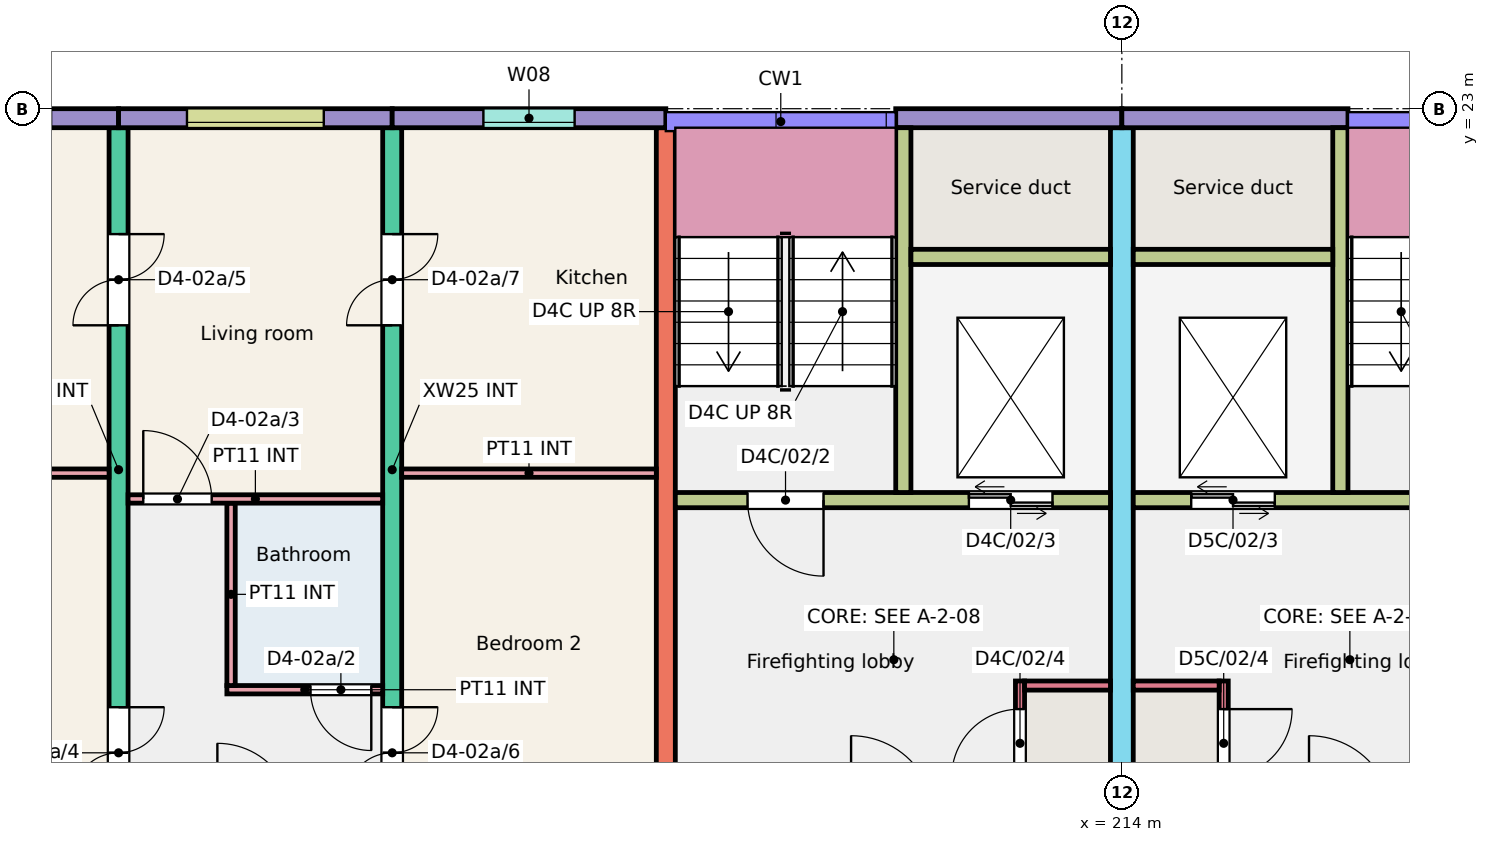
"""IFC4 building model, lengths in metres.
Left out: names, types, materials, properties, quantities, classifications, styles, units other than length and angle.
Written with IfcOpenShell. Run it as: python <this file> out.ifc"""

import sys

from ifc_helpers import new_model, si_unit, direction, frame, frame_2d, origin, place, context, subcontext, project, spatial, rectangle, extrude, element, fill, save


model = new_model("IFC4")
c1 = context("Model", 3, precision=1e-05, world=origin(), true_north=direction((0.0, 1.0)))
c2 = subcontext(c1, "Body", "Model", "MODEL_VIEW")
j1 = project(units=[si_unit("LENGTHUNIT", "METRE"), si_unit("PLANEANGLEUNIT", "RADIAN")], contexts=[c1])
p1 = place(None, origin())
s1 = spatial("IfcSite", under=j1, at=p1, CompositionType="ELEMENT")
p2 = place(p1, origin())
s2 = spatial("IfcBuilding", under=s1, at=p2, CompositionType="ELEMENT")
p3 = place(p2, frame((0.0, 0.0, 6.0)))
s3 = spatial("IfcBuildingStorey", under=s2, at=p3, CompositionType="ELEMENT", Elevation=6.0)
p4 = place(p3, frame((200.8, 13.75, 0.0), z_axis=(0.0, 0.0, 1.0), x_axis=(0.0, 1.0, 0.0)))
e1 = element("IfcWall", 1, at=p4, inside=s3, PredefinedType="SHEAR", context=c2, shape_type="SweptSolid", body=[
    extrude(rectangle(XDim=9.0, YDim=0.25, at=frame_2d((4.5, 0.0))), origin(), (0.0, 0.0, 1.0), 3.0),
])
p5 = place(p4, frame((0.175, 0.0, 0.0)))
e2 = element("IfcOpeningElement", 2, at=p5, cuts=e1, PredefinedType="OPENING", context=c2, shape_type="SweptSolid", body=[
    extrude(rectangle(XDim=1.2, YDim=2.1, at=frame_2d((0.6, 1.05))), frame((0.0, 0.135, 0.0), z_axis=(0.0, -1.0, 0.0), x_axis=(1.0, 0.0, 0.0)), (0.0, 0.0, 1.0), 0.27),
])
p6 = place(p4, frame((6.4, 0.0, 0.0)))
e3 = element("IfcOpeningElement", 3, at=p6, cuts=e1, PredefinedType="OPENING", context=c2, shape_type="SweptSolid", body=[
    extrude(rectangle(XDim=1.2, YDim=2.1, at=frame_2d((0.6, 1.05))), frame((0.0, 0.135, 0.0), z_axis=(0.0, -1.0, 0.0), x_axis=(1.0, 0.0, 0.0)), (0.0, 0.0, 1.0), 0.27),
])
p7 = place(p3, frame((204.4, 13.75, 0.0), z_axis=(0.0, 0.0, 1.0), x_axis=(0.0, 1.0, 0.0)))
e4 = element("IfcWall", 4, at=p7, inside=s3, PredefinedType="SHEAR", context=c2, shape_type="SweptSolid", body=[
    extrude(rectangle(XDim=9.0, YDim=0.25, at=frame_2d((4.5, 0.0))), origin(), (0.0, 0.0, 1.0), 3.0),
])
p8 = place(p7, frame((0.175, 0.0, 0.0)))
e5 = element("IfcOpeningElement", 5, at=p8, cuts=e4, PredefinedType="OPENING", context=c2, shape_type="SweptSolid", body=[
    extrude(rectangle(XDim=1.2, YDim=2.1, at=frame_2d((0.6, 1.05))), frame((0.0, 0.135, 0.0), z_axis=(0.0, -1.0, 0.0), x_axis=(1.0, 0.0, 0.0)), (0.0, 0.0, 1.0), 0.27),
])
p9 = place(p7, frame((6.4, 0.0, 0.0)))
e6 = element("IfcOpeningElement", 6, at=p9, cuts=e4, PredefinedType="OPENING", context=c2, shape_type="SweptSolid", body=[
    extrude(rectangle(XDim=1.2, YDim=2.1, at=frame_2d((0.6, 1.05))), frame((0.0, 0.135, 0.0), z_axis=(0.0, -1.0, 0.0), x_axis=(1.0, 0.0, 0.0)), (0.0, 0.0, 1.0), 0.27),
])
p10 = place(p3, frame((208.0, 13.75, 0.0), z_axis=(0.0, 0.0, 1.0), x_axis=(0.0, 1.0, 0.0)))
e7 = element("IfcWall", 7, at=p10, inside=s3, PredefinedType="SHEAR", context=c2, shape_type="SweptSolid", body=[
    extrude(rectangle(XDim=9.0, YDim=0.25, at=frame_2d((4.5, 0.0))), origin(), (0.0, 0.0, 1.0), 3.0),
])
p11 = place(p3, frame((214.0, 11.75, 0.0), z_axis=(0.0, 0.0, 1.0), x_axis=(0.0, 1.0, 0.0)))
e8 = element("IfcWall", 8, at=p11, inside=s3, PredefinedType="SHEAR", context=c2, shape_type="SweptSolid", body=[
    extrude(rectangle(XDim=11.0, YDim=0.3, at=frame_2d((5.5, 0.0))), origin(), (0.0, 0.0, 1.0), 3.0),
])
p12 = place(p11, frame((0.3, 0.0, 0.0)))
e9 = element("IfcOpeningElement", 9, at=p12, cuts=e8, PredefinedType="OPENING", context=c2, shape_type="SweptSolid", body=[
    extrude(rectangle(XDim=1.2, YDim=2.1, at=frame_2d((0.6, 1.05))), frame((0.0, 0.16, 0.0), z_axis=(0.0, -1.0, 0.0), x_axis=(1.0, 0.0, 0.0)), (0.0, 0.0, 1.0), 0.32),
])
p13 = place(p3, frame((197.2, 22.875, 0.0), z_axis=(0.0, 0.0, 1.0), x_axis=(1.0, 0.0, 0.0)))
e10 = element("IfcWall", 10, at=p13, inside=s3, PredefinedType="SOLIDWALL", context=c2, shape_type="SweptSolid", body=[
    extrude(rectangle(XDim=3.6, YDim=0.25, at=frame_2d((1.8, 0.0))), origin(), (0.0, 0.0, 1.0), 3.0),
])
p14 = place(p13, frame((0.913, 0.0, 1.1)))
e11 = element("IfcOpeningElement", 11, at=p14, cuts=e10, PredefinedType="OPENING", context=c2, shape_type="SweptSolid", body=[
    extrude(rectangle(XDim=1.8, YDim=1.3, at=frame_2d((0.9, 0.65))), frame((0.0, 0.135, 0.0), z_axis=(0.0, -1.0, 0.0), x_axis=(1.0, 0.0, 0.0)), (0.0, 0.0, 1.0), 0.27),
])
p15 = place(p3, frame((200.8, 22.875, 0.0), z_axis=(0.0, 0.0, 1.0), x_axis=(1.0, 0.0, 0.0)))
e12 = element("IfcWall", 12, at=p15, inside=s3, PredefinedType="SOLIDWALL", context=c2, shape_type="SweptSolid", body=[
    extrude(rectangle(XDim=3.6, YDim=0.25, at=frame_2d((1.8, 0.0))), origin(), (0.0, 0.0, 1.0), 3.0),
])
p16 = place(p15, frame((0.9, 0.0, 1.1)))
e13 = element("IfcOpeningElement", 13, at=p16, cuts=e12, PredefinedType="OPENING", context=c2, shape_type="SweptSolid", body=[
    extrude(rectangle(XDim=1.8, YDim=1.3, at=frame_2d((0.9, 0.65))), frame((0.0, 0.135, 0.0), z_axis=(0.0, -1.0, 0.0), x_axis=(1.0, 0.0, 0.0)), (0.0, 0.0, 1.0), 0.27),
])
p17 = place(p3, frame((204.4, 22.875, 0.0), z_axis=(0.0, 0.0, 1.0), x_axis=(1.0, 0.0, 0.0)))
e14 = element("IfcWall", 14, at=p17, inside=s3, PredefinedType="SOLIDWALL", context=c2, shape_type="SweptSolid", body=[
    extrude(rectangle(XDim=3.6, YDim=0.25, at=frame_2d((1.8, 0.0))), origin(), (0.0, 0.0, 1.0), 3.0),
])
p18 = place(p17, frame((1.2, 0.0, 1.1)))
e15 = element("IfcOpeningElement", 15, at=p18, cuts=e14, PredefinedType="OPENING", context=c2, shape_type="SweptSolid", body=[
    extrude(rectangle(XDim=1.2, YDim=1.3, at=frame_2d((0.6, 0.65))), frame((0.0, 0.135, 0.0), z_axis=(0.0, -1.0, 0.0), x_axis=(1.0, 0.0, 0.0)), (0.0, 0.0, 1.0), 0.27),
])
p19 = place(p3, frame((211.025, 22.875, 0.0), z_axis=(0.0, 0.0, 1.0), x_axis=(1.0, 0.0, 0.0)))
e16 = element("IfcWall", 16, at=p19, inside=s3, PredefinedType="SOLIDWALL", context=c2, shape_type="SweptSolid", body=[
    extrude(rectangle(XDim=2.975, YDim=0.25, at=frame_2d((1.488, 0.0))), origin(), (0.0, 0.0, 1.0), 3.0),
])
p20 = place(p3, frame((208.125, 17.85, 0.0), z_axis=(0.0, 0.0, 1.0), x_axis=(1.0, 0.0, 0.0)))
e17 = element("IfcWall", 17, at=p20, inside=s3, PredefinedType="SHEAR", context=c2, shape_type="SweptSolid", body=[
    extrude(rectangle(XDim=5.725, YDim=0.2, at=frame_2d((2.863, 0.0))), origin(), (0.0, 0.0, 1.0), 3.0),
])
p21 = place(p20, frame((0.95, 0.0, 0.0)))
e18 = element("IfcOpeningElement", 18, at=p21, cuts=e17, PredefinedType="OPENING", context=c2, shape_type="SweptSolid", body=[
    extrude(rectangle(XDim=1.0, YDim=2.1, at=frame_2d((0.5, 1.05))), frame((0.0, 0.11, 0.0), z_axis=(0.0, -1.0, 0.0), x_axis=(1.0, 0.0, 0.0)), (0.0, 0.0, 1.0), 0.22),
])
p22 = place(p20, frame((3.863, 0.0, 0.0)))
e19 = element("IfcOpeningElement", 19, at=p22, cuts=e17, PredefinedType="OPENING", context=c2, shape_type="SweptSolid", body=[
    extrude(rectangle(XDim=1.1, YDim=2.1, at=frame_2d((0.55, 1.05))), frame((0.0, 0.11, 0.0), z_axis=(0.0, -1.0, 0.0), x_axis=(1.0, 0.0, 0.0)), (0.0, 0.0, 1.0), 0.22),
])
p23 = place(p3, frame((211.125, 17.95, 0.0), z_axis=(0.0, 0.0, 1.0), x_axis=(0.0, 1.0, 0.0)))
e20 = element("IfcWall", 20, at=p23, inside=s3, PredefinedType="SHEAR", context=c2, shape_type="SweptSolid", body=[
    extrude(rectangle(XDim=4.8, YDim=0.2, at=frame_2d((2.4, 0.0))), origin(), (0.0, 0.0, 1.0), 3.0),
])
p24 = place(p3, frame((211.225, 21.05, 0.0), z_axis=(0.0, 0.0, 1.0), x_axis=(1.0, 0.0, 0.0)))
e21 = element("IfcWall", 21, at=p24, inside=s3, PredefinedType="SHEAR", context=c2, shape_type="SweptSolid", body=[
    extrude(rectangle(XDim=2.625, YDim=0.2, at=frame_2d((1.312, 0.0))), origin(), (0.0, 0.0, 1.0), 3.0),
])
p25 = place(p3, frame((212.66, 13.75, 0.0), z_axis=(0.0, 0.0, 1.0), x_axis=(0.0, 1.0, 0.0)))
e22 = element("IfcWall", 22, at=p25, inside=s3, PredefinedType="SHEAR", context=c2, shape_type="SweptSolid", body=[
    extrude(rectangle(XDim=1.72, YDim=0.12, at=frame_2d((0.86, 0.0))), origin(), (0.0, 0.0, 1.0), 3.0),
])
p26 = place(p25, frame((0.45, 0.0, 0.0)))
e23 = element("IfcOpeningElement", 23, at=p26, cuts=e22, PredefinedType="OPENING", context=c2, shape_type="SweptSolid", body=[
    extrude(rectangle(XDim=0.9, YDim=2.1, at=frame_2d((0.45, 1.05))), frame((0.0, 0.07, 0.0), z_axis=(0.0, -1.0, 0.0), x_axis=(1.0, 0.0, 0.0)), (0.0, 0.0, 1.0), 0.14),
])
p27 = place(p3, frame((212.72, 15.41, 0.0), z_axis=(0.0, 0.0, 1.0), x_axis=(1.0, 0.0, 0.0)))
e24 = element("IfcWall", 24, at=p27, inside=s3, PredefinedType="SHEAR", context=c2, shape_type="SweptSolid", body=[
    extrude(rectangle(XDim=1.13, YDim=0.12, at=frame_2d((0.565, 0.0))), origin(), (0.0, 0.0, 1.0), 3.0),
])
p28 = place(p3, frame((214.0, 22.875, 0.0), z_axis=(0.0, 0.0, 1.0), x_axis=(1.0, 0.0, 0.0)))
e25 = element("IfcWall", 25, at=p28, inside=s3, PredefinedType="SOLIDWALL", context=c2, shape_type="SweptSolid", body=[
    extrude(rectangle(XDim=2.975, YDim=0.25, at=frame_2d((1.488, 0.0))), origin(), (0.0, 0.0, 1.0), 3.0),
])
p29 = place(p3, frame((214.15, 17.85, 0.0), z_axis=(0.0, 0.0, 1.0), x_axis=(1.0, 0.0, 0.0)))
e26 = element("IfcWall", 26, at=p29, inside=s3, PredefinedType="SHEAR", context=c2, shape_type="SweptSolid", body=[
    extrude(rectangle(XDim=5.725, YDim=0.2, at=frame_2d((2.863, 0.0))), origin(), (0.0, 0.0, 1.0), 3.0),
])
p30 = place(p29, frame((3.775, 0.0, 0.0)))
e27 = element("IfcOpeningElement", 27, at=p30, cuts=e26, PredefinedType="OPENING", context=c2, shape_type="SweptSolid", body=[
    extrude(rectangle(XDim=1.0, YDim=2.1, at=frame_2d((0.5, 1.05))), frame((0.0, 0.11, 0.0), z_axis=(0.0, -1.0, 0.0), x_axis=(1.0, 0.0, 0.0)), (0.0, 0.0, 1.0), 0.22),
])
p31 = place(p29, frame((0.762, 0.0, 0.0)))
e28 = element("IfcOpeningElement", 28, at=p31, cuts=e26, PredefinedType="OPENING", context=c2, shape_type="SweptSolid", body=[
    extrude(rectangle(XDim=1.1, YDim=2.1, at=frame_2d((0.55, 1.05))), frame((0.0, 0.11, 0.0), z_axis=(0.0, -1.0, 0.0), x_axis=(1.0, 0.0, 0.0)), (0.0, 0.0, 1.0), 0.22),
])
p32 = place(p3, frame((216.875, 17.95, 0.0), z_axis=(0.0, 0.0, 1.0), x_axis=(0.0, 1.0, 0.0)))
e29 = element("IfcWall", 29, at=p32, inside=s3, PredefinedType="SHEAR", context=c2, shape_type="SweptSolid", body=[
    extrude(rectangle(XDim=4.8, YDim=0.2, at=frame_2d((2.4, 0.0))), origin(), (0.0, 0.0, 1.0), 3.0),
])
p33 = place(p3, frame((214.15, 21.05, 0.0), z_axis=(0.0, 0.0, 1.0), x_axis=(1.0, 0.0, 0.0)))
e30 = element("IfcWall", 30, at=p33, inside=s3, PredefinedType="SHEAR", context=c2, shape_type="SweptSolid", body=[
    extrude(rectangle(XDim=2.625, YDim=0.2, at=frame_2d((1.312, 0.0))), origin(), (0.0, 0.0, 1.0), 3.0),
])
p34 = place(p3, frame((215.34, 13.75, 0.0), z_axis=(0.0, 0.0, 1.0), x_axis=(0.0, 1.0, 0.0)))
e31 = element("IfcWall", 31, at=p34, inside=s3, PredefinedType="SHEAR", context=c2, shape_type="SweptSolid", body=[
    extrude(rectangle(XDim=1.72, YDim=0.12, at=frame_2d((0.86, 0.0))), origin(), (0.0, 0.0, 1.0), 3.0),
])
p35 = place(p34, frame((0.45, 0.0, 0.0)))
e32 = element("IfcOpeningElement", 32, at=p35, cuts=e31, PredefinedType="OPENING", context=c2, shape_type="SweptSolid", body=[
    extrude(rectangle(XDim=0.9, YDim=2.1, at=frame_2d((0.45, 1.05))), frame((0.0, 0.07, 0.0), z_axis=(0.0, -1.0, 0.0), x_axis=(1.0, 0.0, 0.0)), (0.0, 0.0, 1.0), 0.14),
])
p36 = place(p3, frame((214.15, 15.41, 0.0), z_axis=(0.0, 0.0, 1.0), x_axis=(1.0, 0.0, 0.0)))
e33 = element("IfcWall", 33, at=p36, inside=s3, PredefinedType="SHEAR", context=c2, shape_type="SweptSolid", body=[
    extrude(rectangle(XDim=1.13, YDim=0.12, at=frame_2d((0.565, 0.0))), origin(), (0.0, 0.0, 1.0), 3.0),
])
p37 = place(p3, frame((202.225, 15.355, 0.0), z_axis=(0.0, 0.0, 1.0), x_axis=(1.0, 0.0, 0.0)))
e34 = element("IfcWall", 34, at=p37, inside=s3, PredefinedType="PARTITIONING", context=c2, shape_type="SweptSolid", body=[
    extrude(rectangle(XDim=2.05, YDim=0.11, at=frame_2d((1.025, 0.0))), origin(), (0.0, 0.0, 1.0), 2.8),
])
p38 = place(p37, frame((1.1, 0.0, 0.0)))
e35 = element("IfcOpeningElement", 35, at=p38, cuts=e34, PredefinedType="OPENING", context=c2, shape_type="SweptSolid", body=[
    extrude(rectangle(XDim=0.8, YDim=2.1, at=frame_2d((0.4, 1.05))), frame((0.0, 0.065, 0.0), z_axis=(0.0, -1.0, 0.0), x_axis=(1.0, 0.0, 0.0)), (0.0, 0.0, 1.0), 0.13),
])
p39 = place(p3, frame((202.28, 15.41, 0.0), z_axis=(0.0, 0.0, 1.0), x_axis=(0.0, 1.0, 0.0)))
e36 = element("IfcWall", 36, at=p39, inside=s3, PredefinedType="PARTITIONING", context=c2, shape_type="SweptSolid", body=[
    extrude(rectangle(XDim=2.4, YDim=0.11, at=frame_2d((1.2, 0.0))), origin(), (0.0, 0.0, 1.0), 2.8),
])
p40 = place(p3, frame((200.925, 17.865, 0.0), z_axis=(0.0, 0.0, 1.0), x_axis=(1.0, 0.0, 0.0)))
e37 = element("IfcWall", 37, at=p40, inside=s3, PredefinedType="PARTITIONING", context=c2, shape_type="SweptSolid", body=[
    extrude(rectangle(XDim=3.35, YDim=0.11, at=frame_2d((1.675, 0.0))), origin(), (0.0, 0.0, 1.0), 2.8),
])
p41 = place(p40, frame((0.2, 0.0, 0.0)))
e38 = element("IfcOpeningElement", 38, at=p41, cuts=e37, PredefinedType="OPENING", context=c2, shape_type="SweptSolid", body=[
    extrude(rectangle(XDim=0.9, YDim=2.1, at=frame_2d((0.45, 1.05))), frame((0.0, 0.065, 0.0), z_axis=(0.0, -1.0, 0.0), x_axis=(1.0, 0.0, 0.0)), (0.0, 0.0, 1.0), 0.13),
])
p42 = place(p3, frame((197.35, 18.205, 0.0), z_axis=(0.0, 0.0, 1.0), x_axis=(1.0, 0.0, 0.0)))
e39 = element("IfcWall", 39, at=p42, inside=s3, PredefinedType="PARTITIONING", context=c2, shape_type="SweptSolid", body=[
    extrude(rectangle(XDim=3.325, YDim=0.11, at=frame_2d((1.663, 0.0))), origin(), (0.0, 0.0, 1.0), 2.8),
])
p43 = place(p3, frame((204.525, 18.205, 0.0), z_axis=(0.0, 0.0, 1.0), x_axis=(1.0, 0.0, 0.0)))
e40 = element("IfcWall", 40, at=p43, inside=s3, PredefinedType="PARTITIONING", context=c2, shape_type="SweptSolid", body=[
    extrude(rectangle(XDim=3.35, YDim=0.11, at=frame_2d((1.675, 0.0))), origin(), (0.0, 0.0, 1.0), 2.8),
])
p44 = place(p18, origin())
e41 = element("IfcWindow", 41, at=p44, inside=s3, PartitioningType="SINGLE_PANEL", PredefinedType="WINDOW", context=c2, shape_type="SweptSolid", body=[
    extrude(rectangle(XDim=1.2, YDim=1.3, at=frame_2d((0.6, 0.65))), frame((0.0, -0.025, 0.0), z_axis=(0.0, -1.0, 0.0), x_axis=(1.0, 0.0, 0.0)), (0.0, 0.0, 1.0), 0.06),
])
fill(e15, e41)
p45 = place(p16, origin())
e42 = element("IfcWindow", 42, at=p45, inside=s3, PartitioningType="SINGLE_PANEL", PredefinedType="WINDOW", context=c2, shape_type="SweptSolid", body=[
    extrude(rectangle(XDim=1.8, YDim=1.3, at=frame_2d((0.9, 0.65))), frame((0.0, -0.025, 0.0), z_axis=(0.0, -1.0, 0.0), x_axis=(1.0, 0.0, 0.0)), (0.0, 0.0, 1.0), 0.06),
])
fill(e13, e42)
p46 = place(p38, origin())
e43 = element("IfcDoor", 43, at=p46, inside=s3, OperationType="SINGLE_SWING_RIGHT", PredefinedType="DOOR", context=c2, shape_type="SweptSolid", body=[
    extrude(rectangle(XDim=0.8, YDim=2.1, at=frame_2d((0.4, 1.05))), frame((0.0, 0.025, 0.0), z_axis=(0.0, -1.0, 0.0), x_axis=(1.0, 0.0, 0.0)), (0.0, 0.0, 1.0), 0.05),
])
fill(e35, e43)
p47 = place(p41, origin())
e44 = element("IfcDoor", 44, at=p47, inside=s3, OperationType="SINGLE_SWING_LEFT", PredefinedType="DOOR", context=c2, shape_type="SweptSolid", body=[
    extrude(rectangle(XDim=0.9, YDim=2.1, at=frame_2d((0.45, 1.05))), frame((0.0, 0.025, 0.0), z_axis=(0.0, -1.0, 0.0), x_axis=(1.0, 0.0, 0.0)), (0.0, 0.0, 1.0), 0.05),
])
fill(e38, e44)
p48 = place(p5, origin())
e45 = element("IfcDoor", 45, at=p48, inside=s3, OperationType="DOUBLE_DOOR_SINGLE_SWING", PredefinedType="DOOR", context=c2, shape_type="SweptSolid", body=[
    extrude(rectangle(XDim=1.2, YDim=2.1, at=frame_2d((0.6, 1.05))), frame((0.0, 0.025, 0.0), z_axis=(0.0, -1.0, 0.0), x_axis=(1.0, 0.0, 0.0)), (0.0, 0.0, 1.0), 0.05),
])
fill(e2, e45)
p49 = place(p6, origin())
e46 = element("IfcDoor", 46, at=p49, inside=s3, OperationType="DOUBLE_DOOR_SINGLE_SWING", PredefinedType="DOOR", context=c2, shape_type="SweptSolid", body=[
    extrude(rectangle(XDim=1.2, YDim=2.1, at=frame_2d((0.6, 1.05))), frame((0.0, 0.025, 0.0), z_axis=(0.0, -1.0, 0.0), x_axis=(1.0, 0.0, 0.0)), (0.0, 0.0, 1.0), 0.05),
])
fill(e3, e46)
p50 = place(p8, origin())
e47 = element("IfcDoor", 47, at=p50, inside=s3, OperationType="DOUBLE_DOOR_SINGLE_SWING", PredefinedType="DOOR", context=c2, shape_type="SweptSolid", body=[
    extrude(rectangle(XDim=1.2, YDim=2.1, at=frame_2d((0.6, 1.05))), frame((0.0, 0.025, 0.0), z_axis=(0.0, -1.0, 0.0), x_axis=(1.0, 0.0, 0.0)), (0.0, 0.0, 1.0), 0.05),
])
fill(e5, e47)
p51 = place(p9, origin())
e48 = element("IfcDoor", 48, at=p51, inside=s3, OperationType="DOUBLE_DOOR_SINGLE_SWING", PredefinedType="DOOR", context=c2, shape_type="SweptSolid", body=[
    extrude(rectangle(XDim=1.2, YDim=2.1, at=frame_2d((0.6, 1.05))), frame((0.0, 0.025, 0.0), z_axis=(0.0, -1.0, 0.0), x_axis=(1.0, 0.0, 0.0)), (0.0, 0.0, 1.0), 0.05),
])
fill(e6, e48)
p52 = place(p21, origin())
e49 = element("IfcDoor", 49, at=p52, inside=s3, OperationType="SINGLE_SWING_RIGHT", PredefinedType="DOOR", context=c2, shape_type="SweptSolid", body=[
    extrude(rectangle(XDim=1.0, YDim=2.1, at=frame_2d((0.5, 1.05))), frame((0.0, 0.025, 0.0), z_axis=(0.0, -1.0, 0.0), x_axis=(1.0, 0.0, 0.0)), (0.0, 0.0, 1.0), 0.05),
])
fill(e18, e49)
p53 = place(p22, origin())
e50 = element("IfcDoor", 50, at=p53, inside=s3, OperationType="DOUBLE_DOOR_SLIDING", PredefinedType="DOOR", context=c2, shape_type="SweptSolid", body=[
    extrude(rectangle(XDim=1.1, YDim=2.1, at=frame_2d((0.55, 1.05))), frame((0.0, 0.025, 0.0), z_axis=(0.0, -1.0, 0.0), x_axis=(1.0, 0.0, 0.0)), (0.0, 0.0, 1.0), 0.05),
])
fill(e19, e50)
p54 = place(p26, origin())
e51 = element("IfcDoor", 51, at=p54, inside=s3, OperationType="SINGLE_SWING_LEFT", PredefinedType="DOOR", context=c2, shape_type="SweptSolid", body=[
    extrude(rectangle(XDim=0.9, YDim=2.1, at=frame_2d((0.45, 1.05))), frame((0.0, 0.025, 0.0), z_axis=(0.0, -1.0, 0.0), x_axis=(1.0, 0.0, 0.0)), (0.0, 0.0, 1.0), 0.05),
])
fill(e23, e51)
p55 = place(p31, origin())
e52 = element("IfcDoor", 52, at=p55, inside=s3, OperationType="DOUBLE_DOOR_SLIDING", PredefinedType="DOOR", context=c2, shape_type="SweptSolid", body=[
    extrude(rectangle(XDim=1.1, YDim=2.1, at=frame_2d((0.55, 1.05))), frame((0.0, 0.025, 0.0), z_axis=(0.0, -1.0, 0.0), x_axis=(1.0, 0.0, 0.0)), (0.0, 0.0, 1.0), 0.05),
])
fill(e28, e52)
p56 = place(p35, origin())
e53 = element("IfcDoor", 53, at=p56, inside=s3, OperationType="SINGLE_SWING_RIGHT", PredefinedType="DOOR", context=c2, shape_type="SweptSolid", body=[
    extrude(rectangle(XDim=0.9, YDim=2.1, at=frame_2d((0.45, 1.05))), frame((0.0, 0.025, 0.0), z_axis=(0.0, -1.0, 0.0), x_axis=(1.0, 0.0, 0.0)), (0.0, 0.0, 1.0), 0.05),
])
fill(e32, e53)
save(model, sys.argv[1])
